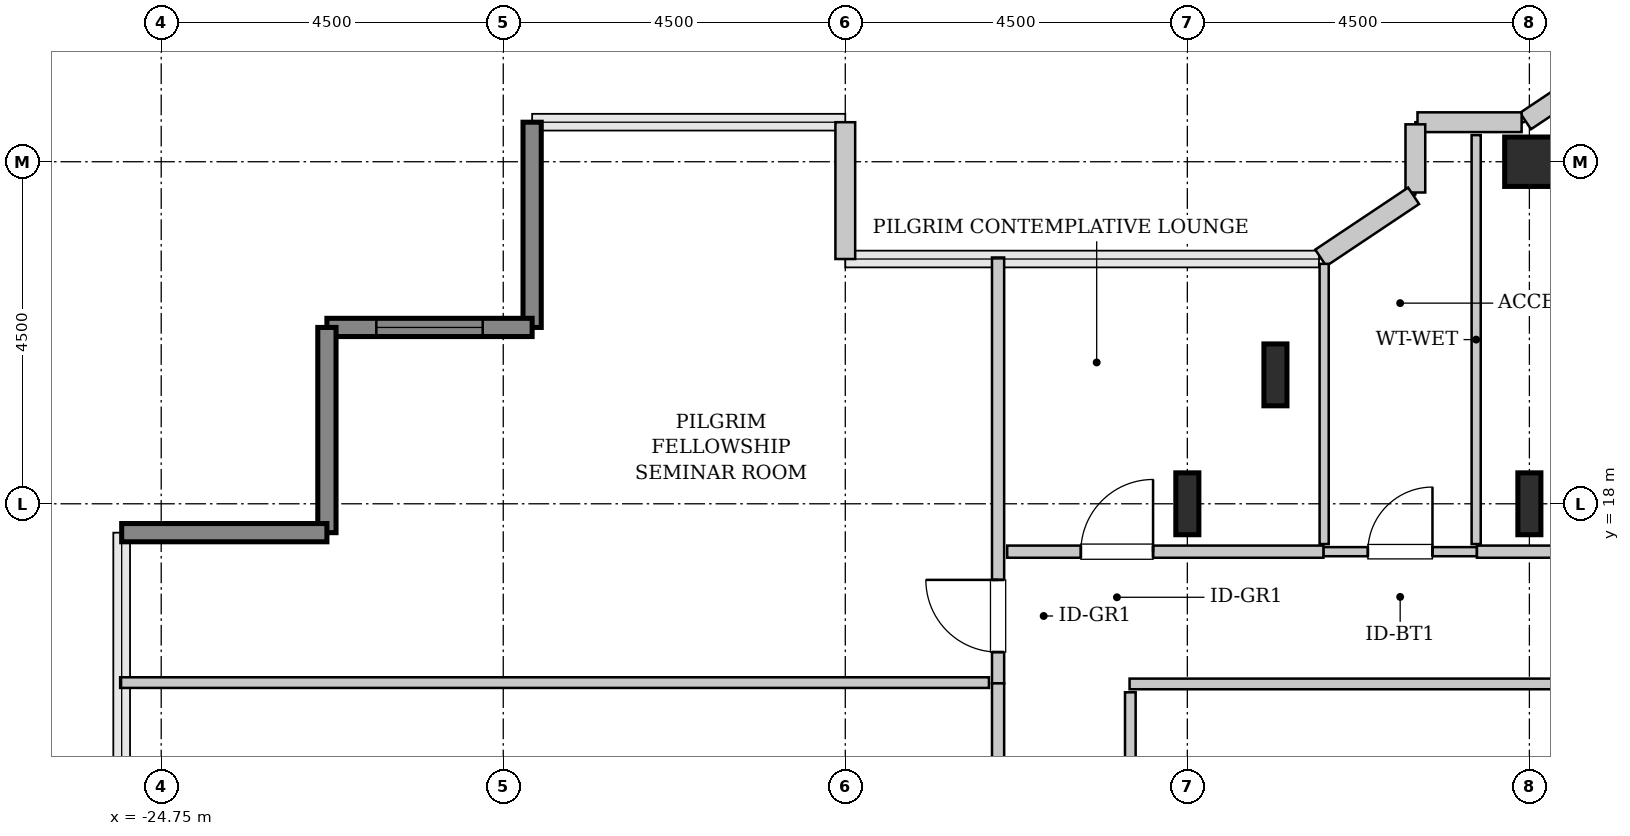
"""IFC4 building model, lengths in metres.
Left out: names, types, materials, properties, quantities, classifications, styles, units other than length and angle.
Written with IfcOpenShell. Run it as: python <this file> out.ifc"""

import sys

from ifc_helpers import new_model, si_unit, direction, frame, frame_2d, origin, origin_2d, place, context, subcontext, project, spatial, rectangle, hollow_rectangle, i_section, extrude, source, transform, mapped, element, fill, save


model = new_model("IFC4")
c1 = context("Model", 3, precision=1e-05, world=origin(), true_north=direction((0.0, 1.0)))
c2 = subcontext(c1, "Body", "Model", "MODEL_VIEW")
j1 = project(units=[si_unit("LENGTHUNIT", "METRE"), si_unit("PLANEANGLEUNIT", "RADIAN")], contexts=[c1])
p1 = place(None, origin())
s1 = spatial("IfcSite", under=j1, at=p1, CompositionType="ELEMENT")
p2 = place(p1, origin())
s2 = spatial("IfcBuilding", under=s1, at=p2, CompositionType="ELEMENT")
p3 = place(p2, frame((0.0, 0.0, 214.2)))
s3 = spatial("IfcBuildingStorey", under=s2, at=p3, CompositionType="ELEMENT", Elevation=214.2)
m1 = source(origin(), c2, "Body", "SweptSolid", [
    extrude(i_section(OverallWidth=0.303, OverallDepth=0.814, WebThickness=0.021, FlangeThickness=0.04, FilletRadius=0.03, at=origin_2d()), origin(), (0.0, 0.0, 1.0), 3.8),
])
for number, where, z_axis, x_axis in (
    (1, (-11.25, 18.0, 0.0), (0.0, 0.0, 1.0), (1.0, 0.0, 0.0)),
    (2, (-10.091, 19.696, 0.0), (0.0, 0.0, 1.0), (1.0, 0.0, 0.0)),
    (3, (-6.75, 18.0, 0.0), (0.0, 0.0, 1.0), (1.0, 0.0, 0.0)),
):
    element("IfcColumn", number, at=place(p3, frame(where, z_axis=z_axis, x_axis=x_axis)), inside=s3, PredefinedType="COLUMN", context=c2, shape_type="MappedRepresentation", body=[
        mapped(m1, transform((0.0, 0.0, 0.0), x_axis=(1.0, 0.0, 0.0), y_axis=(0.0, 1.0, 0.0), z_axis=(0.0, 0.0, 1.0), scale=1.0)),
    ])
m2 = source(origin(), c2, "Body", "SweptSolid", [
    extrude(hollow_rectangle(XDim=0.65, YDim=0.65, WallThickness=0.032, InnerFilletRadius=0.032, OuterFilletRadius=0.064, at=origin_2d()), origin(), (0.0, 0.0, 1.0), 3.8),
])
p4 = place(p3, frame((-6.75, 22.5, 0.0), z_axis=(0.0, 0.0, 1.0), x_axis=(1.0, 0.0, 0.0)))
e4 = element("IfcColumn", 4, at=p4, inside=s3, PredefinedType="COLUMN", context=c2, shape_type="MappedRepresentation", body=[
    mapped(m2, transform((0.0, 0.0, 0.0), x_axis=(1.0, 0.0, 0.0), y_axis=(0.0, 1.0, 0.0), z_axis=(0.0, 0.0, 1.0), scale=1.0)),
])
m3 = source(origin(), c2, "Body", "SweptSolid", [
    extrude(rectangle(XDim=0.565, YDim=0.26, at=frame_2d((0.283, 0.0))), origin(), (0.0, 0.0, 1.0), 3.55),
])
p5 = place(p3, frame((-6.331, 23.35, 0.0), z_axis=(0.0, 0.0, 1.0), x_axis=(-0.831651492666, -0.555297933317, 0.0)))
e5 = element("IfcWall", 5, at=p5, inside=s3, PredefinedType="SOLIDWALL", context=c2, shape_type="MappedRepresentation", body=[
    mapped(m3, transform((0.0, 0.0, 0.0), x_axis=(1.0, 0.0, 0.0), y_axis=(0.0, 1.0, 0.0), z_axis=(0.0, 0.0, 1.0), scale=1.0)),
])
m4 = source(origin(), c2, "Body", "SweptSolid", [
    extrude(rectangle(XDim=1.37, YDim=0.26, at=frame_2d((0.685, 0.0))), origin(), (0.0, 0.0, 1.0), 3.55),
])
p6 = place(p3, frame((-6.852, 23.02, 0.0), z_axis=(0.0, 0.0, 1.0), x_axis=(-1.0, 0.0, 0.0)))
e6 = element("IfcWall", 6, at=p6, inside=s3, PredefinedType="SOLIDWALL", context=c2, shape_type="MappedRepresentation", body=[
    mapped(m4, transform((0.0, 0.0, 0.0), x_axis=(1.0, 0.0, 0.0), y_axis=(0.0, 1.0, 0.0), z_axis=(0.0, 0.0, 1.0), scale=1.0)),
])
m5 = source(origin(), c2, "Body", "SweptSolid", [
    extrude(rectangle(XDim=0.897, YDim=0.26, at=frame_2d((0.448, 0.0))), origin(), (0.0, 0.0, 1.0), 3.55),
])
p7 = place(p3, frame((-8.25, 22.992, 0.0), z_axis=(0.0, 0.0, 1.0), x_axis=(0.0, -1.0, 0.0)))
e7 = element("IfcWall", 7, at=p7, inside=s3, PredefinedType="SOLIDWALL", context=c2, shape_type="MappedRepresentation", body=[
    mapped(m5, transform((0.0, 0.0, 0.0), x_axis=(1.0, 0.0, 0.0), y_axis=(0.0, 1.0, 0.0), z_axis=(0.0, 0.0, 1.0), scale=1.0)),
])
m6 = source(origin(), c2, "Body", "SweptSolid", [
    extrude(rectangle(XDim=1.469, YDim=0.26, at=frame_2d((0.734, 0.0))), origin(), (0.0, 0.0, 1.0), 3.55),
])
p8 = place(p3, frame((-8.273, 22.052, 0.0), z_axis=(0.0, 0.0, 1.0), x_axis=(-0.831461760506, -0.555581983884, 0.0)))
e8 = element("IfcWall", 8, at=p8, inside=s3, PredefinedType="SOLIDWALL", context=c2, shape_type="MappedRepresentation", body=[
    mapped(m6, transform((0.0, 0.0, 0.0), x_axis=(1.0, 0.0, 0.0), y_axis=(0.0, 1.0, 0.0), z_axis=(0.0, 0.0, 1.0), scale=1.0)),
])
m7 = source(origin(), c2, "Body", "SweptSolid", [
    extrude(rectangle(XDim=1.8, YDim=0.26, at=frame_2d((0.9, 0.0))), origin(), (0.0, 0.0, 1.0), 3.55),
])
p9 = place(p3, frame((-15.75, 21.22, 0.0), z_axis=(0.0, 0.0, 1.0), x_axis=(0.0, 1.0, 0.0)))
e9 = element("IfcWall", 9, at=p9, inside=s3, PredefinedType="SOLIDWALL", context=c2, shape_type="MappedRepresentation", body=[
    mapped(m7, transform((0.0, 0.0, 0.0), x_axis=(1.0, 0.0, 0.0), y_axis=(0.0, 1.0, 0.0), z_axis=(0.0, 0.0, 1.0), scale=1.0)),
])
m8 = source(origin(), c2, "Body", "SweptSolid", [
    extrude(rectangle(XDim=2.7, YDim=0.24, at=frame_2d((1.35, 0.0))), origin(), (0.0, 0.0, 1.0), 3.55),
])
p10 = place(p3, frame((-19.87, 23.02, 0.0), z_axis=(0.0, 0.0, 1.0), x_axis=(0.0, -1.0, 0.0)))
e10 = element("IfcWall", 10, at=p10, inside=s3, PredefinedType="SHEAR", context=c2, shape_type="MappedRepresentation", body=[
    mapped(m8, transform((0.0, 0.0, 0.0), x_axis=(1.0, 0.0, 0.0), y_axis=(0.0, 1.0, 0.0), z_axis=(0.0, 0.0, 1.0), scale=1.0)),
])
p11 = place(p3, frame((-19.87, 20.32, 0.0), z_axis=(0.0, 0.0, 1.0), x_axis=(-1.0, 0.0, 0.0)))
e11 = element("IfcWall", 11, at=p11, inside=s3, PredefinedType="SHEAR", context=c2, shape_type="MappedRepresentation", body=[
    mapped(m8, transform((0.0, 0.0, 0.0), x_axis=(1.0, 0.0, 0.0), y_axis=(0.0, 1.0, 0.0), z_axis=(0.0, 0.0, 1.0), scale=1.0)),
])
p12 = place(p11, frame((0.65, 0.0, 0.85)))
e12 = element("IfcOpeningElement", 12, at=p12, cuts=e11, PredefinedType="OPENING", context=c2, shape_type="SweptSolid", body=[
    extrude(rectangle(XDim=1.4, YDim=1.8, at=frame_2d((0.7, 0.9))), frame((0.0, 0.13, 0.0), z_axis=(0.0, -1.0, 0.0), x_axis=(1.0, 0.0, 0.0)), (0.0, 0.0, 1.0), 0.26),
])
for number, where, z_axis, x_axis in (
    (13, (-22.57, 20.32, 0.0), (0.0, 0.0, 1.0), (0.0, -1.0, 0.0)),
    (14, (-22.57, 17.62, 0.0), (0.0, 0.0, 1.0), (-1.0, 0.0, 0.0)),
):
    element("IfcWall", number, at=place(p3, frame(where, z_axis=z_axis, x_axis=x_axis)), inside=s3, PredefinedType="SHEAR", context=c2, shape_type="MappedRepresentation", body=[
        mapped(m8, transform((0.0, 0.0, 0.0), x_axis=(1.0, 0.0, 0.0), y_axis=(0.0, 1.0, 0.0), z_axis=(0.0, 0.0, 1.0), scale=1.0)),
    ])
m9 = source(origin(), c2, "Body", "SweptSolid", [
    extrude(rectangle(XDim=2.02, YDim=0.12, at=frame_2d((1.01, 0.0))), origin(), (0.0, 0.0, 1.0), 3.535),
])
p13 = place(p3, frame((-9.46, 17.37, 0.0), z_axis=(0.0, 0.0, 1.0), x_axis=(1.0, 0.0, 0.0)))
e15 = element("IfcWall", 15, at=p13, inside=s3, PredefinedType="PLUMBINGWALL", context=c2, shape_type="MappedRepresentation", body=[
    mapped(m9, transform((0.0, 0.0, 0.0), x_axis=(1.0, 0.0, 0.0), y_axis=(0.0, 1.0, 0.0), z_axis=(0.0, 0.0, 1.0), scale=1.0)),
])
p14 = place(p13, frame((0.585, 0.0, 0.0)))
e16 = element("IfcOpeningElement", 16, at=p14, cuts=e15, PredefinedType="OPENING", context=c2, shape_type="SweptSolid", body=[
    extrude(rectangle(XDim=0.85, YDim=2.1, at=frame_2d((0.425, 1.05))), frame((0.0, 0.07, 0.0), z_axis=(0.0, -1.0, 0.0), x_axis=(1.0, 0.0, 0.0)), (0.0, 0.0, 1.0), 0.14),
])
m10 = source(origin(), c2, "Body", "SweptSolid", [
    extrude(rectangle(XDim=5.38, YDim=0.12, at=frame_2d((2.69, 0.0))), origin(), (0.0, 0.0, 1.0), 3.535),
])
p15 = place(p3, frame((-7.45, 17.47, 0.0), z_axis=(0.0, 0.0, 1.0), x_axis=(0.0, 1.0, 0.0)))
e17 = element("IfcWall", 17, at=p15, inside=s3, PredefinedType="PLUMBINGWALL", context=c2, shape_type="MappedRepresentation", body=[
    mapped(m10, transform((0.0, 0.0, 0.0), x_axis=(1.0, 0.0, 0.0), y_axis=(0.0, 1.0, 0.0), z_axis=(0.0, 0.0, 1.0), scale=1.0)),
])
m11 = source(origin(), c2, "Body", "SweptSolid", [
    extrude(rectangle(XDim=3.687, YDim=0.12, at=frame_2d((1.843, 0.0))), origin(), (0.0, 0.0, 1.0), 3.535),
])
p16 = place(p3, frame((-9.45, 17.47, 0.0), z_axis=(0.0, 0.0, 1.0), x_axis=(0.0, 1.0, 0.0)))
e18 = element("IfcWall", 18, at=p16, inside=s3, PredefinedType="PLUMBINGWALL", context=c2, shape_type="MappedRepresentation", body=[
    mapped(m11, transform((0.0, 0.0, 0.0), x_axis=(1.0, 0.0, 0.0), y_axis=(0.0, 1.0, 0.0), z_axis=(0.0, 0.0, 1.0), scale=1.0)),
])
m12 = source(origin(), c2, "Body", "SweptSolid", [
    extrude(rectangle(XDim=5.603, YDim=0.16, at=frame_2d((2.801, 0.0))), origin(), (0.0, 0.0, 1.0), 3.535),
])
p17 = place(p3, frame((-13.74, 15.637, 0.0), z_axis=(0.0, 0.0, 1.0), x_axis=(0.0, 1.0, 0.0)))
e19 = element("IfcWall", 19, at=p17, inside=s3, PredefinedType="PARTITIONING", context=c2, shape_type="MappedRepresentation", body=[
    mapped(m12, transform((0.0, 0.0, 0.0), x_axis=(1.0, 0.0, 0.0), y_axis=(0.0, 1.0, 0.0), z_axis=(0.0, 0.0, 1.0), scale=1.0)),
])
p18 = place(p17, frame((0.411, 0.0, 0.0)))
e20 = element("IfcOpeningElement", 20, at=p18, cuts=e19, PredefinedType="OPENING", context=c2, shape_type="SweptSolid", body=[
    extrude(rectangle(XDim=0.95, YDim=2.1, at=frame_2d((0.475, 1.05))), frame((0.0, 0.09, 0.0), z_axis=(0.0, -1.0, 0.0), x_axis=(1.0, 0.0, 0.0)), (0.0, 0.0, 1.0), 0.18),
])
m13 = source(origin(), c2, "Body", "SweptSolid", [
    extrude(rectangle(XDim=11.43, YDim=0.14, at=frame_2d((5.715, 0.0))), origin(), (0.0, 0.0, 1.0), 3.535),
])
p19 = place(p3, frame((-25.29, 15.647, 0.0), z_axis=(0.0, 0.0, 1.0), x_axis=(1.0, 0.0, 0.0)))
e21 = element("IfcWall", 21, at=p19, inside=s3, PredefinedType="PARTITIONING", context=c2, shape_type="MappedRepresentation", body=[
    mapped(m13, transform((0.0, 0.0, 0.0), x_axis=(1.0, 0.0, 0.0), y_axis=(0.0, 1.0, 0.0), z_axis=(0.0, 0.0, 1.0), scale=1.0)),
])
m14 = source(origin(), c2, "Body", "SweptSolid", [
    extrude(rectangle(XDim=7.343, YDim=0.16, at=frame_2d((3.671, 0.0))), origin(), (0.0, 0.0, 1.0), 3.535),
])
p20 = place(p3, frame((-13.74, 8.295, 0.0), z_axis=(0.0, 0.0, 1.0), x_axis=(0.0, 1.0, 0.0)))
e22 = element("IfcWall", 22, at=p20, inside=s3, PredefinedType="PARTITIONING", context=c2, shape_type="MappedRepresentation", body=[
    mapped(m14, transform((0.0, 0.0, 0.0), x_axis=(1.0, 0.0, 0.0), y_axis=(0.0, 1.0, 0.0), z_axis=(0.0, 0.0, 1.0), scale=1.0)),
])
p21 = place(p20, frame((3.196, 0.0, 0.0)))
e23 = element("IfcOpeningElement", 23, at=p21, cuts=e22, PredefinedType="OPENING", context=c2, shape_type="SweptSolid", body=[
    extrude(rectangle(XDim=0.95, YDim=2.1, at=frame_2d((0.475, 1.05))), frame((0.0, 0.09, 0.0), z_axis=(0.0, -1.0, 0.0), x_axis=(1.0, 0.0, 0.0)), (0.0, 0.0, 1.0), 0.18),
])
m15 = source(origin(), c2, "Body", "SweptSolid", [
    extrude(rectangle(XDim=14.615, YDim=0.14, at=frame_2d((7.308, 0.0))), origin(), (0.0, 0.0, 1.0), 3.535),
])
p22 = place(p3, frame((-12.01, 15.63, 0.0), z_axis=(0.0, 0.0, 1.0), x_axis=(1.0, 0.0, 0.0)))
e24 = element("IfcWall", 24, at=p22, inside=s3, PredefinedType="PARTITIONING", context=c2, shape_type="MappedRepresentation", body=[
    mapped(m15, transform((0.0, 0.0, 0.0), x_axis=(1.0, 0.0, 0.0), y_axis=(0.0, 1.0, 0.0), z_axis=(0.0, 0.0, 1.0), scale=1.0)),
])
m16 = source(origin(), c2, "Body", "SweptSolid", [
    extrude(rectangle(XDim=3.93, YDim=0.14, at=frame_2d((1.965, 0.0))), origin(), (0.0, 0.0, 1.0), 3.535),
])
p23 = place(p3, frame((-12.0, 11.59, 0.0), z_axis=(0.0, 0.0, 1.0), x_axis=(0.0, 1.0, 0.0)))
e25 = element("IfcWall", 25, at=p23, inside=s3, PredefinedType="PARTITIONING", context=c2, shape_type="MappedRepresentation", body=[
    mapped(m16, transform((0.0, 0.0, 0.0), x_axis=(1.0, 0.0, 0.0), y_axis=(0.0, 1.0, 0.0), z_axis=(0.0, 0.0, 1.0), scale=1.0)),
])
m17 = source(origin(), c2, "Body", "SweptSolid", [
    extrude(rectangle(XDim=10.045, YDim=0.16, at=frame_2d((5.022, 0.0))), origin(), (0.0, 0.0, 1.0), 3.535),
])
p24 = place(p3, frame((-7.44, 17.37, 0.0), z_axis=(0.0, 0.0, 1.0), x_axis=(1.0, 0.0, 0.0)))
e26 = element("IfcWall", 26, at=p24, inside=s3, PredefinedType="PARTITIONING", context=c2, shape_type="MappedRepresentation", body=[
    mapped(m17, transform((0.0, 0.0, 0.0), x_axis=(1.0, 0.0, 0.0), y_axis=(0.0, 1.0, 0.0), z_axis=(0.0, 0.0, 1.0), scale=1.0)),
])
p25 = place(p24, frame((3.865, 0.0, 0.0)))
e27 = element("IfcOpeningElement", 27, at=p25, cuts=e26, PredefinedType="OPENING", context=c2, shape_type="SweptSolid", body=[
    extrude(rectangle(XDim=0.95, YDim=2.1, at=frame_2d((0.475, 1.05))), frame((0.0, 0.09, 0.0), z_axis=(0.0, -1.0, 0.0), x_axis=(1.0, 0.0, 0.0)), (0.0, 0.0, 1.0), 0.18),
])
m18 = source(origin(), c2, "Body", "SweptSolid", [
    extrude(rectangle(XDim=4.16, YDim=0.16, at=frame_2d((2.08, 0.0))), origin(), (0.0, 0.0, 1.0), 3.535),
])
p26 = place(p3, frame((-13.62, 17.37, 0.0), z_axis=(0.0, 0.0, 1.0), x_axis=(1.0, 0.0, 0.0)))
e28 = element("IfcWall", 28, at=p26, inside=s3, PredefinedType="PARTITIONING", context=c2, shape_type="MappedRepresentation", body=[
    mapped(m18, transform((0.0, 0.0, 0.0), x_axis=(1.0, 0.0, 0.0), y_axis=(0.0, 1.0, 0.0), z_axis=(0.0, 0.0, 1.0), scale=1.0)),
])
p27 = place(p26, frame((0.969, 0.0, 0.0)))
e29 = element("IfcOpeningElement", 29, at=p27, cuts=e28, PredefinedType="OPENING", context=c2, shape_type="SweptSolid", body=[
    extrude(rectangle(XDim=0.95, YDim=2.1, at=frame_2d((0.475, 1.05))), frame((0.0, 0.09, 0.0), z_axis=(0.0, -1.0, 0.0), x_axis=(1.0, 0.0, 0.0)), (0.0, 0.0, 1.0), 0.18),
])
m19 = source(origin(), c2, "Body", "SweptSolid", [
    extrude(rectangle(XDim=1.4, YDim=1.8, at=frame_2d((0.7, 0.9))), frame((0.0, 0.03, 0.0), z_axis=(0.0, -1.0, 0.0), x_axis=(1.0, 0.0, 0.0)), (0.0, 0.0, 1.0), 0.06),
])
p28 = place(p12, origin())
e30 = element("IfcWindow", 30, at=p28, inside=s3, PartitioningType="SINGLE_PANEL", PredefinedType="WINDOW", context=c2, shape_type="MappedRepresentation", body=[
    mapped(m19, transform((0.0, 0.0, 0.0), x_axis=(1.0, 0.0, 0.0), y_axis=(0.0, 1.0, 0.0), z_axis=(0.0, 0.0, 1.0), scale=1.0)),
])
fill(e12, e30)
m20 = source(origin(), c2, "Body", "SweptSolid", [
    extrude(rectangle(XDim=0.85, YDim=2.1, at=frame_2d((0.425, 1.05))), frame((0.0, 0.025, 0.0), z_axis=(0.0, -1.0, 0.0), x_axis=(1.0, 0.0, 0.0)), (0.0, 0.0, 1.0), 0.05),
])
p29 = place(p14, origin())
e31 = element("IfcDoor", 31, at=p29, inside=s3, OperationType="SINGLE_SWING_RIGHT", PredefinedType="DOOR", context=c2, shape_type="MappedRepresentation", body=[
    mapped(m20, transform((0.0, 0.0, 0.0), x_axis=(1.0, 0.0, 0.0), y_axis=(0.0, 1.0, 0.0), z_axis=(0.0, 0.0, 1.0), scale=1.0)),
])
fill(e16, e31)
m21 = source(origin(), c2, "Body", "SweptSolid", [
    extrude(rectangle(XDim=0.95, YDim=2.1, at=frame_2d((0.475, 1.05))), frame((0.0, 0.025, 0.0), z_axis=(0.0, -1.0, 0.0), x_axis=(1.0, 0.0, 0.0)), (0.0, 0.0, 1.0), 0.05),
])
p30 = place(p18, origin())
e32 = element("IfcDoor", 32, at=p30, inside=s3, OperationType="SINGLE_SWING_RIGHT", PredefinedType="DOOR", context=c2, shape_type="MappedRepresentation", body=[
    mapped(m21, transform((0.0, 0.0, 0.0), x_axis=(1.0, 0.0, 0.0), y_axis=(0.0, 1.0, 0.0), z_axis=(0.0, 0.0, 1.0), scale=1.0)),
])
fill(e20, e32)
p31 = place(p27, origin())
e33 = element("IfcDoor", 33, at=p31, inside=s3, OperationType="SINGLE_SWING_RIGHT", PredefinedType="DOOR", context=c2, shape_type="MappedRepresentation", body=[
    mapped(m21, transform((0.0, 0.0, 0.0), x_axis=(1.0, 0.0, 0.0), y_axis=(0.0, 1.0, 0.0), z_axis=(0.0, 0.0, 1.0), scale=1.0)),
])
fill(e29, e33)
save(model, sys.argv[1])
